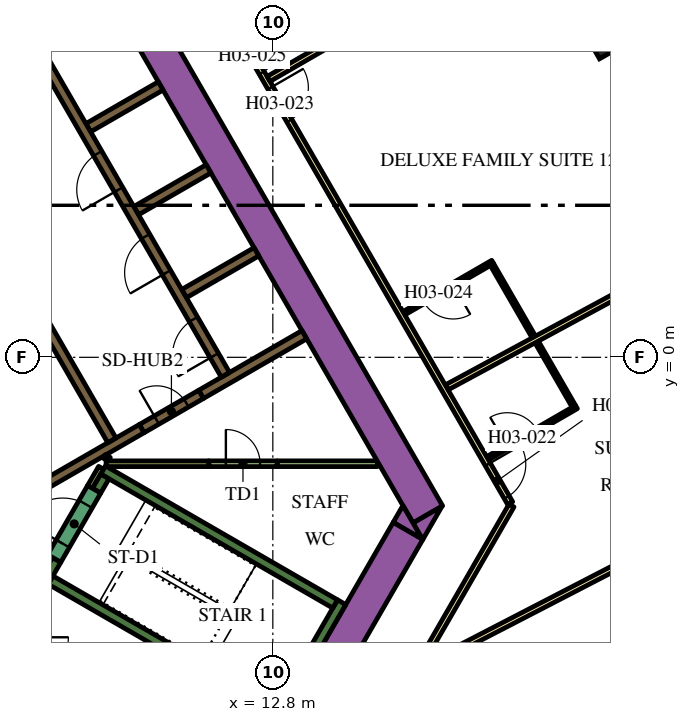
"""IFC4 building model, lengths in metres.
Left out: names, types, materials, properties, quantities, classifications, styles, units other than length and angle.
Written with IfcOpenShell. Run it as: python <this file> out.ifc"""

import sys

from ifc_helpers import new_model, si_unit, direction, frame, frame_2d, origin, origin_2d, place, context, subcontext, project, spatial, polyline, rectangle, outline, extrude, element, fill, save


model = new_model("IFC4")
c1 = context("Model", 3, precision=1e-05, world=origin(), true_north=direction((0.0, 1.0)))
c2 = subcontext(c1, "Body", "Model", "MODEL_VIEW")
j1 = project(units=[si_unit("LENGTHUNIT", "METRE"), si_unit("PLANEANGLEUNIT", "RADIAN")], contexts=[c1])
p1 = place(None, origin())
s1 = spatial("IfcSite", under=j1, at=p1, CompositionType="ELEMENT")
p2 = place(p1, origin())
s2 = spatial("IfcBuilding", under=s1, at=p2, CompositionType="ELEMENT")
p3 = place(p2, frame((0.0, 0.0, 58.8)))
s3 = spatial("IfcBuildingStorey", under=s2, at=p3, CompositionType="ELEMENT", Elevation=58.8)
p4 = place(p3, frame((21.443, 8.685, 0.0), z_axis=(0.0, 0.0, 1.0), x_axis=(-0.491973853463, 0.870609974391, 0.0)))
e1 = element("IfcColumn", 1, at=p4, inside=s3, PredefinedType="COLUMN", context=c2, shape_type="SweptSolid", body=[
    extrude(rectangle(XDim=1.4, YDim=0.9, at=origin_2d()), origin(), (0.0, 0.0, 1.0), 3.9),
])
p5 = place(p3, frame((6.776, 13.364, 0.0), z_axis=(0.0, 0.0, 1.0), x_axis=(0.500004177138, -0.8660229921, 0.0)))
e2 = element("IfcWall", 2, at=p5, inside=s3, PredefinedType="SOLIDWALL", context=c2, shape_type="SweptSolid", body=[
    extrude(rectangle(XDim=20.204, YDim=0.9, at=frame_2d((10.102, 0.0))), origin(), (0.0, 0.0, 1.0), 3.9),
])
p6 = place(p3, origin())
e3 = element("IfcWall", 3, at=p6, inside=s3, PredefinedType="SOLIDWALL", context=c2, shape_type="SweptSolid", body=[
    extrude(outline(polyline([(16.743, -4.8), (16.489, -4.36), (17.251, -3.92), (16.743, -4.8)])), origin(), (0.0, 0.0, 1.0), 3.9),
])
p7 = place(p3, frame((11.695, -12.644, 0.0), z_axis=(0.0, 0.0, 1.0), x_axis=(0.500010229568, 0.86601949766, 0.0)))
e4 = element("IfcWall", 4, at=p7, inside=s3, PredefinedType="SOLIDWALL", context=c2, shape_type="SweptSolid", body=[
    extrude(rectangle(XDim=9.326, YDim=0.9, at=frame_2d((4.663, 0.0))), origin(), (0.0, 0.0, 1.0), 3.9),
])
e5 = element("IfcWall", 5, at=p6, inside=s3, PredefinedType="SOLIDWALL", context=c2, shape_type="SweptSolid", body=[
    extrude(outline(polyline([(16.223, -3.9), (16.732, -4.78), (15.969, -4.34), (16.223, -3.9)])), origin(), (0.0, 0.0, 1.0), 3.9),
])
p8 = place(p3, frame((12.885, -9.431, 0.0), z_axis=(0.0, 0.0, 1.0), x_axis=(0.500020560727, 0.866013532718, 0.0)))
e6 = element("IfcWall", 6, at=p8, inside=s3, PredefinedType="SOLIDWALL", context=c2, shape_type="SweptSolid", body=[
    extrude(rectangle(XDim=3.45, YDim=0.25, at=frame_2d((1.725, 0.0))), origin(), (0.0, 0.0, 1.0), 3.9),
])
p9 = place(p3, frame((12.84, -9.261, 0.0), z_axis=(0.0, 0.0, 1.0), x_axis=(-0.866013990052, 0.500019768644, 0.0)))
e7 = element("IfcWall", 7, at=p9, inside=s3, PredefinedType="SOLIDWALL", context=c2, shape_type="SweptSolid", body=[
    extrude(rectangle(XDim=6.8, YDim=0.25, at=frame_2d((3.4, 0.0))), origin(), (0.0, 0.0, 1.0), 3.9),
])
p10 = place(p3, frame((7.113, -5.33, 0.0), z_axis=(0.0, 0.0, 1.0), x_axis=(-0.499965889992, -0.866045096311, 0.0)))
e8 = element("IfcWall", 8, at=p10, inside=s3, PredefinedType="SOLIDWALL", context=c2, shape_type="SweptSolid", body=[
    extrude(rectangle(XDim=0.666, YDim=0.25, at=frame_2d((0.333, 0.0))), origin(), (0.0, 0.0, 1.0), 3.9),
])
p11 = place(p3, frame((8.334, -2.964, 0.0), z_axis=(0.0, 0.0, 1.0), x_axis=(0.866016039709, -0.500016218704, 0.0)))
e9 = element("IfcWall", 9, at=p11, inside=s3, PredefinedType="SOLIDWALL", context=c2, shape_type="SweptSolid", body=[
    extrude(rectangle(XDim=7.05, YDim=0.25, at=frame_2d((3.525, 0.0))), origin(), (0.0, 0.0, 1.0), 3.9),
])
p12 = place(p3, frame((8.163, -3.511, 0.0), z_axis=(0.0, 0.0, 1.0), x_axis=(0.500127794843, 0.865951608824, 0.0)))
e10 = element("IfcWall", 10, at=p12, inside=s3, PredefinedType="SOLIDWALL", context=c2, shape_type="SweptSolid", body=[
    extrude(rectangle(XDim=0.435, YDim=0.25, at=frame_2d((0.217, 0.0))), origin(), (0.0, 0.0, 1.0), 3.9),
])
p13 = place(p3, frame((10.464, 1.677, 0.0), z_axis=(0.0, 0.0, 1.0), x_axis=(0.86605622881, 0.499946605688, 0.0)))
e11 = element("IfcWall", 11, at=p13, inside=s3, PredefinedType="SOLIDWALL", context=c2, shape_type="SweptSolid", body=[
    extrude(rectangle(XDim=2.2, YDim=0.25, at=frame_2d((1.1, 0.0))), origin(), (0.0, 0.0, 1.0), 3.9),
])
p14 = place(p3, frame((9.352, -1.875, 0.0), z_axis=(0.0, 0.0, 1.0), x_axis=(-0.866024844342, -0.500000968981, 0.0)))
e12 = element("IfcWall", 12, at=p14, inside=s3, PredefinedType="SOLIDWALL", context=c2, shape_type="SweptSolid", body=[
    extrude(rectangle(XDim=3.162, YDim=0.25, at=frame_2d((1.581, 0.0))), origin(), (0.0, 0.0, 1.0), 3.9),
])
for number, where, z_axis, x_axis in (
    (13, (7.944, 6.041, 0.0), (0.0, 0.0, 1.0), (0.866, 0.5, 0.0)),
    (14, (9.204, 3.859, 0.0), (0.0, 0.0, 1.0), (0.866, 0.5, 0.0)),
):
    element("IfcWall", number, at=place(p3, frame(where, z_axis=z_axis, x_axis=x_axis)), inside=s3, PredefinedType="SOLIDWALL", context=c2, shape_type="SweptSolid", body=[
        extrude(rectangle(XDim=2.2, YDim=0.25, at=frame_2d((1.1, 0.0))), origin(), (0.0, 0.0, 1.0), 3.9),
    ])
p15 = place(p3, frame((10.911, -0.975, 0.0), z_axis=(0.0, 0.0, 1.0), x_axis=(0.866046979468, 0.499962627957, 0.0)))
e15 = element("IfcWall", 15, at=p15, inside=s3, PredefinedType="SOLIDWALL", context=c2, shape_type="SweptSolid", body=[
    extrude(rectangle(XDim=3.138, YDim=0.25, at=frame_2d((1.569, 0.0))), origin(), (0.0, 0.0, 1.0), 3.9),
])
p16 = place(p3, frame((8.412, -2.8, 0.0), z_axis=(0.0, 0.0, 1.0), x_axis=(1.0, 0.0, 0.0)))
e16 = element("IfcWall", 16, at=p16, inside=s3, PredefinedType="PARTITIONING", context=c2, shape_type="SweptSolid", body=[
    extrude(rectangle(XDim=2.702, YDim=0.15, at=frame_2d((1.351, 0.0))), origin(), (0.0, 0.0, 1.0), 3.9),
])
p17 = place(p3, frame((8.459, -2.599, 0.0), z_axis=(0.0, 0.0, 1.0), x_axis=(-0.501919277433, -0.864914469148, 0.0)))
e17 = element("IfcWall", 17, at=p17, inside=s3, PredefinedType="PARTITIONING", context=c2, shape_type="SweptSolid", body=[
    extrude(rectangle(XDim=0.109, YDim=0.15, at=frame_2d((0.054, 0.0))), origin(), (0.0, 0.0, 1.0), 3.9),
])
p18 = place(p3, frame((8.281, -2.907, 0.0), z_axis=(0.0, 0.0, 1.0), x_axis=(-0.500193841991, -0.86591346013, 0.0)))
e18 = element("IfcWall", 18, at=p18, inside=s3, PredefinedType="PARTITIONING", context=c2, shape_type="SweptSolid", body=[
    extrude(rectangle(XDim=0.583, YDim=0.15, at=frame_2d((0.292, 0.0))), origin(), (0.0, 0.0, 1.0), 3.9),
])
p19 = place(p3, frame((12.915, -2.8, 0.0), z_axis=(0.0, 0.0, 1.0), x_axis=(1.0, 0.0, 0.0)))
e19 = element("IfcWall", 19, at=p19, inside=s3, PredefinedType="PARTITIONING", context=c2, shape_type="SweptSolid", body=[
    extrude(rectangle(XDim=2.637, YDim=0.15, at=frame_2d((1.318, 0.0))), origin(), (0.0, 0.0, 1.0), 2.75),
])
p20 = place(p3, frame((11.553, -0.46, 0.0), z_axis=(0.0, 0.0, 1.0), x_axis=(-0.500006514828, 0.866021642414, 0.0)))
e20 = element("IfcWall", 20, at=p20, inside=s3, PredefinedType="SOLIDWALL", context=c2, shape_type="SweptSolid", body=[
    extrude(rectangle(XDim=12.35, YDim=0.25, at=frame_2d((6.175, 0.0))), origin(), (0.0, 0.0, 1.0), 3.9),
])
p21 = place(p20, frame((0.585, 0.0, 0.0)))
e21 = element("IfcOpeningElement", 21, at=p21, cuts=e20, PredefinedType="OPENING", context=c2, shape_type="SweptSolid", body=[
    extrude(rectangle(XDim=1.1, YDim=2.1, at=frame_2d((0.55, 1.05))), frame((0.0, 0.135, 0.0), z_axis=(0.0, -1.0, 0.0), x_axis=(1.0, 0.0, 0.0)), (0.0, 0.0, 1.0), 0.27),
])
p22 = place(p20, frame((3.105, 0.0, 0.0)))
e22 = element("IfcOpeningElement", 22, at=p22, cuts=e20, PredefinedType="OPENING", context=c2, shape_type="SweptSolid", body=[
    extrude(rectangle(XDim=1.1, YDim=2.1, at=frame_2d((0.55, 1.05))), frame((0.0, 0.135, 0.0), z_axis=(0.0, -1.0, 0.0), x_axis=(1.0, 0.0, 0.0)), (0.0, 0.0, 1.0), 0.27),
])
p23 = place(p20, frame((5.625, 0.0, 0.0)))
e23 = element("IfcOpeningElement", 23, at=p23, cuts=e20, PredefinedType="OPENING", context=c2, shape_type="SweptSolid", body=[
    extrude(rectangle(XDim=1.1, YDim=2.1, at=frame_2d((0.55, 1.05))), frame((0.0, 0.135, 0.0), z_axis=(0.0, -1.0, 0.0), x_axis=(1.0, 0.0, 0.0)), (0.0, 0.0, 1.0), 0.27),
])
p24 = place(p3, frame((8.565, -2.185, 0.0), z_axis=(0.0, 0.0, 1.0), x_axis=(-0.499997954832, 0.866026584559, 0.0)))
e24 = element("IfcWall", 24, at=p24, inside=s3, PredefinedType="SOLIDWALL", context=c2, shape_type="SweptSolid", body=[
    extrude(rectangle(XDim=12.35, YDim=0.25, at=frame_2d((6.175, 0.0))), origin(), (0.0, 0.0, 1.0), 3.9),
])
p25 = place(p24, frame((5.725, 0.0, 0.0)))
e25 = element("IfcOpeningElement", 25, at=p25, cuts=e24, PredefinedType="OPENING", context=c2, shape_type="SweptSolid", body=[
    extrude(rectangle(XDim=0.9, YDim=2.1, at=frame_2d((0.45, 1.05))), frame((0.0, 0.135, 0.0), z_axis=(0.0, -1.0, 0.0), x_axis=(1.0, 0.0, 0.0)), (0.0, 0.0, 1.0), 0.27),
])
p26 = place(p3, frame((7.048, -5.292, 0.0), z_axis=(0.0, 0.0, 1.0), x_axis=(0.49994051562, 0.866059744384, 0.0)))
e26 = element("IfcWall", 26, at=p26, inside=s3, PredefinedType="SOLIDWALL", context=c2, shape_type="SweptSolid", body=[
    extrude(rectangle(XDim=2.1, YDim=0.4, at=frame_2d((1.05, 0.0))), origin(), (0.0, 0.0, 1.0), 3.9),
])
p27 = place(p26, frame((0.45, 0.0, 0.0)))
e27 = element("IfcOpeningElement", 27, at=p27, cuts=e26, PredefinedType="OPENING", context=c2, shape_type="SweptSolid", body=[
    extrude(rectangle(XDim=1.2, YDim=2.1, at=frame_2d((0.6, 1.05))), frame((0.0, 0.21, 0.0), z_axis=(0.0, -1.0, 0.0), x_axis=(1.0, 0.0, 0.0)), (0.0, 0.0, 1.0), 0.42),
])
p28 = place(p3, frame((9.352, -1.875, 0.0), z_axis=(0.0, 0.0, 1.0), x_axis=(0.865989075817, 0.500062916607, 0.0)))
e28 = element("IfcWall", 28, at=p28, inside=s3, PredefinedType="SOLIDWALL", context=c2, shape_type="SweptSolid", body=[
    extrude(rectangle(XDim=1.8, YDim=0.25, at=frame_2d((0.9, 0.0))), origin(), (0.0, 0.0, 1.0), 3.9),
])
p29 = place(p28, frame((0.45, 0.0, 0.0)))
e29 = element("IfcOpeningElement", 29, at=p29, cuts=e28, PredefinedType="OPENING", context=c2, shape_type="SweptSolid", body=[
    extrude(rectangle(XDim=0.9, YDim=2.1, at=frame_2d((0.45, 1.05))), frame((0.0, 0.135, 0.0), z_axis=(0.0, -1.0, 0.0), x_axis=(1.0, 0.0, 0.0)), (0.0, 0.0, 1.0), 0.27),
])
p30 = place(p3, frame((11.115, -2.8, 0.0), z_axis=(0.0, 0.0, 1.0), x_axis=(1.0, 0.0, 0.0)))
e30 = element("IfcWall", 30, at=p30, inside=s3, PredefinedType="PARTITIONING", context=c2, shape_type="SweptSolid", body=[
    extrude(rectangle(XDim=1.8, YDim=0.15, at=frame_2d((0.9, 0.0))), origin(), (0.0, 0.0, 1.0), 2.75),
])
p31 = place(p30, frame((0.45, 0.0, 0.0)))
e31 = element("IfcOpeningElement", 31, at=p31, cuts=e30, PredefinedType="OPENING", context=c2, shape_type="SweptSolid", body=[
    extrude(rectangle(XDim=0.9, YDim=2.1, at=frame_2d((0.45, 1.05))), frame((0.0, 0.085, 0.0), z_axis=(0.0, -1.0, 0.0), x_axis=(1.0, 0.0, 0.0)), (0.0, 0.0, 1.0), 0.17),
])
p32 = place(p3, frame((19.081, -3.9, 0.0), z_axis=(0.0, 0.0, 1.0), x_axis=(-0.499974327079, -0.866040225545, 0.0)))
e32 = element("IfcWall", 32, at=p32, inside=s3, PredefinedType="PARTITIONING", context=c2, shape_type="SweptSolid", body=[
    extrude(rectangle(XDim=5.258, YDim=0.15, at=frame_2d((2.629, 0.0))), origin(), (0.0, 0.0, 1.0), 2.75),
])
p33 = place(p3, frame((6.163, 18.475, 0.0), z_axis=(0.0, 0.0, 1.0), x_axis=(0.500001317485, -0.866024643133, 0.0)))
e33 = element("IfcWall", 33, at=p33, inside=s3, PredefinedType="PARTITIONING", context=c2, shape_type="SweptSolid", body=[
    extrude(rectangle(XDim=25.767, YDim=0.15, at=frame_2d((12.883, 0.0))), origin(), (0.0, 0.0, 1.0), 2.75),
])
p34 = place(p33, frame((24.586, 0.0, 0.0)))
e34 = element("IfcOpeningElement", 34, at=p34, cuts=e33, PredefinedType="OPENING", context=c2, shape_type="SweptSolid", body=[
    extrude(rectangle(XDim=1.0, YDim=2.1, at=frame_2d((0.5, 1.05))), frame((0.0, 0.085, 0.0), z_axis=(0.0, -1.0, 0.0), x_axis=(1.0, 0.0, 0.0)), (0.0, 0.0, 1.0), 0.17),
])
p35 = place(p33, frame((13.144, 0.0, 0.0)))
e35 = element("IfcOpeningElement", 35, at=p35, cuts=e33, PredefinedType="OPENING", context=c2, shape_type="SweptSolid", body=[
    extrude(rectangle(XDim=1.0, YDim=2.1, at=frame_2d((0.5, 1.05))), frame((0.0, 0.085, 0.0), z_axis=(0.0, -1.0, 0.0), x_axis=(1.0, 0.0, 0.0)), (0.0, 0.0, 1.0), 0.17),
])
p36 = place(p33, frame((11.692, 0.0, 0.0)))
e36 = element("IfcOpeningElement", 36, at=p36, cuts=e33, PredefinedType="OPENING", context=c2, shape_type="SweptSolid", body=[
    extrude(rectangle(XDim=1.0, YDim=2.1, at=frame_2d((0.5, 1.05))), frame((0.0, 0.085, 0.0), z_axis=(0.0, -1.0, 0.0), x_axis=(1.0, 0.0, 0.0)), (0.0, 0.0, 1.0), 0.17),
])
p37 = place(p33, frame((0.572, 0.0, 0.0)))
e37 = element("IfcOpeningElement", 37, at=p37, cuts=e33, PredefinedType="OPENING", context=c2, shape_type="SweptSolid", body=[
    extrude(rectangle(XDim=1.0, YDim=2.1, at=frame_2d((0.5, 1.05))), frame((0.0, 0.085, 0.0), z_axis=(0.0, -1.0, 0.0), x_axis=(1.0, 0.0, 0.0)), (0.0, 0.0, 1.0), 0.17),
])
p38 = place(p3, frame((19.982, 11.537, 0.0), z_axis=(0.0, 0.0, 1.0), x_axis=(-0.866020994654, -0.500007636761, 0.0)))
e38 = element("IfcWall", 38, at=p38, inside=s3, PredefinedType="PARTITIONING", context=c2, shape_type="SweptSolid", body=[
    extrude(rectangle(XDim=8.423, YDim=0.15, at=frame_2d((4.211, 0.0))), origin(), (0.0, 0.0, 1.0), 2.75),
])
p39 = place(p3, frame((27.134, -2.779, 0.0), z_axis=(0.0, 0.0, 1.0), x_axis=(-0.8882049501, -0.459447457951, 0.0)))
e39 = element("IfcWall", 39, at=p39, inside=s3, PredefinedType="PARTITIONING", context=c2, shape_type="SweptSolid", body=[
    extrude(rectangle(XDim=11.638, YDim=0.15, at=frame_2d((5.819, 0.0))), origin(), (0.0, 0.0, 1.0), 2.75),
])
p40 = place(p3, frame((24.145, 2.871, 0.0), z_axis=(0.0, 0.0, 1.0), x_axis=(-0.879551725039, -0.475803281809, 0.0)))
e40 = element("IfcWall", 40, at=p40, inside=s3, PredefinedType="PARTITIONING", context=c2, shape_type="SweptSolid", body=[
    extrude(rectangle(XDim=7.688, YDim=0.15, at=frame_2d((3.844, 0.0))), origin(), (0.0, 0.0, 1.0), 2.75),
])
p41 = place(p3, frame((18.451, -2.657, 0.0), z_axis=(0.0, 0.0, 1.0), x_axis=(0.86599734893, 0.500048589285, 0.0)))
e41 = element("IfcWall", 41, at=p41, inside=s3, PredefinedType="PARTITIONING", context=c2, shape_type="SweptSolid", body=[
    extrude(rectangle(XDim=2.7, YDim=0.1, at=frame_2d((1.35, 0.0))), origin(), (0.0, 0.0, 1.0), 2.75),
])
p42 = place(p41, frame((0.6, 0.0, 0.0)))
e42 = element("IfcOpeningElement", 42, at=p42, cuts=e41, PredefinedType="OPENING", context=c2, shape_type="SweptSolid", body=[
    extrude(rectangle(XDim=0.9, YDim=2.1, at=frame_2d((0.45, 1.05))), frame((0.0, 0.06, 0.0), z_axis=(0.0, -1.0, 0.0), x_axis=(1.0, 0.0, 0.0)), (0.0, 0.0, 1.0), 0.12),
])
p43 = place(p3, frame((20.716, -1.281, 0.0), z_axis=(0.0, 0.0, 1.0), x_axis=(-0.499969367985, 0.866043088465, 0.0)))
e43 = element("IfcWall", 43, at=p43, inside=s3, PredefinedType="PARTITIONING", context=c2, shape_type="SweptSolid", body=[
    extrude(rectangle(XDim=1.94, YDim=0.1, at=frame_2d((0.97, 0.0))), origin(), (0.0, 0.0, 1.0), 2.75),
])
p44 = place(p3, frame((18.586, 2.509, 0.0), z_axis=(0.0, 0.0, 1.0), x_axis=(-0.866059108428, -0.4999416173, 0.0)))
e44 = element("IfcWall", 44, at=p44, inside=s3, PredefinedType="PARTITIONING", context=c2, shape_type="SweptSolid", body=[
    extrude(rectangle(XDim=2.7, YDim=0.1, at=frame_2d((1.35, 0.0))), origin(), (0.0, 0.0, 1.0), 2.75),
])
p45 = place(p44, frame((1.2, 0.0, 0.0)))
e45 = element("IfcOpeningElement", 45, at=p45, cuts=e44, PredefinedType="OPENING", context=c2, shape_type="SweptSolid", body=[
    extrude(rectangle(XDim=0.9, YDim=2.1, at=frame_2d((0.45, 1.05))), frame((0.0, 0.06, 0.0), z_axis=(0.0, -1.0, 0.0), x_axis=(1.0, 0.0, 0.0)), (0.0, 0.0, 1.0), 0.12),
])
p46 = place(p3, frame((18.567, 2.441, 0.0), z_axis=(0.0, 0.0, 1.0), x_axis=(0.499946605688, -0.86605622881, 0.0)))
e46 = element("IfcWall", 46, at=p46, inside=s3, PredefinedType="PARTITIONING", context=c2, shape_type="SweptSolid", body=[
    extrude(rectangle(XDim=2.2, YDim=0.1, at=frame_2d((1.1, 0.0))), origin(), (0.0, 0.0, 1.0), 2.75),
])
p47 = place(p21, origin())
e47 = element("IfcDoor", 47, at=p47, inside=s3, OperationType="DOUBLE_DOOR_SLIDING", PredefinedType="DOOR", context=c2, shape_type="SweptSolid", body=[
    extrude(rectangle(XDim=1.1, YDim=2.1, at=frame_2d((0.55, 1.05))), frame((0.0, 0.025, 0.0), z_axis=(0.0, -1.0, 0.0), x_axis=(1.0, 0.0, 0.0)), (0.0, 0.0, 1.0), 0.05),
])
fill(e21, e47)
p48 = place(p22, origin())
e48 = element("IfcDoor", 48, at=p48, inside=s3, OperationType="DOUBLE_DOOR_SLIDING", PredefinedType="DOOR", context=c2, shape_type="SweptSolid", body=[
    extrude(rectangle(XDim=1.1, YDim=2.1, at=frame_2d((0.55, 1.05))), frame((0.0, 0.025, 0.0), z_axis=(0.0, -1.0, 0.0), x_axis=(1.0, 0.0, 0.0)), (0.0, 0.0, 1.0), 0.05),
])
fill(e22, e48)
p49 = place(p23, origin())
e49 = element("IfcDoor", 49, at=p49, inside=s3, OperationType="DOUBLE_DOOR_SLIDING", PredefinedType="DOOR", context=c2, shape_type="SweptSolid", body=[
    extrude(rectangle(XDim=1.1, YDim=2.1, at=frame_2d((0.55, 1.05))), frame((0.0, 0.025, 0.0), z_axis=(0.0, -1.0, 0.0), x_axis=(1.0, 0.0, 0.0)), (0.0, 0.0, 1.0), 0.05),
])
fill(e23, e49)
p50 = place(p27, origin())
e50 = element("IfcDoor", 50, at=p50, inside=s3, OperationType="SINGLE_SWING_LEFT", PredefinedType="DOOR", context=c2, shape_type="SweptSolid", body=[
    extrude(rectangle(XDim=1.2, YDim=2.1, at=frame_2d((0.6, 1.05))), frame((0.0, 0.025, 0.0), z_axis=(0.0, -1.0, 0.0), x_axis=(1.0, 0.0, 0.0)), (0.0, 0.0, 1.0), 0.05),
])
fill(e27, e50)
p51 = place(p29, origin())
e51 = element("IfcDoor", 51, at=p51, inside=s3, OperationType="SINGLE_SWING_LEFT", PredefinedType="DOOR", context=c2, shape_type="SweptSolid", body=[
    extrude(rectangle(XDim=0.9, YDim=2.1, at=frame_2d((0.45, 1.05))), frame((0.0, 0.025, 0.0), z_axis=(0.0, -1.0, 0.0), x_axis=(1.0, 0.0, 0.0)), (0.0, 0.0, 1.0), 0.05),
])
fill(e29, e51)
p52 = place(p31, origin())
e52 = element("IfcDoor", 52, at=p52, inside=s3, OperationType="SINGLE_SWING_LEFT", PredefinedType="DOOR", context=c2, shape_type="SweptSolid", body=[
    extrude(rectangle(XDim=0.9, YDim=2.1, at=frame_2d((0.45, 1.05))), frame((0.0, 0.025, 0.0), z_axis=(0.0, -1.0, 0.0), x_axis=(1.0, 0.0, 0.0)), (0.0, 0.0, 1.0), 0.05),
])
fill(e31, e52)
p53 = place(p34, origin())
e53 = element("IfcDoor", 53, at=p53, inside=s3, OperationType="SINGLE_SWING_RIGHT", PredefinedType="DOOR", context=c2, shape_type="SweptSolid", body=[
    extrude(rectangle(XDim=1.0, YDim=2.1, at=frame_2d((0.5, 1.05))), frame((0.0, 0.025, 0.0), z_axis=(0.0, -1.0, 0.0), x_axis=(1.0, 0.0, 0.0)), (0.0, 0.0, 1.0), 0.05),
])
fill(e34, e53)
p54 = place(p42, origin())
e54 = element("IfcDoor", 54, at=p54, inside=s3, OperationType="SINGLE_SWING_LEFT", PredefinedType="DOOR", context=c2, shape_type="SweptSolid", body=[
    extrude(rectangle(XDim=0.9, YDim=2.1, at=frame_2d((0.45, 1.05))), frame((0.0, 0.025, 0.0), z_axis=(0.0, -1.0, 0.0), x_axis=(1.0, 0.0, 0.0)), (0.0, 0.0, 1.0), 0.05),
])
fill(e42, e54)
p55 = place(p35, origin())
e55 = element("IfcDoor", 55, at=p55, inside=s3, OperationType="SINGLE_SWING_LEFT", PredefinedType="DOOR", context=c2, shape_type="SweptSolid", body=[
    extrude(rectangle(XDim=1.0, YDim=2.1, at=frame_2d((0.5, 1.05))), frame((0.0, 0.025, 0.0), z_axis=(0.0, -1.0, 0.0), x_axis=(1.0, 0.0, 0.0)), (0.0, 0.0, 1.0), 0.05),
])
fill(e35, e55)
p56 = place(p45, origin())
e56 = element("IfcDoor", 56, at=p56, inside=s3, OperationType="SINGLE_SWING_RIGHT", PredefinedType="DOOR", context=c2, shape_type="SweptSolid", body=[
    extrude(rectangle(XDim=0.9, YDim=2.1, at=frame_2d((0.45, 1.05))), frame((0.0, 0.025, 0.0), z_axis=(0.0, -1.0, 0.0), x_axis=(1.0, 0.0, 0.0)), (0.0, 0.0, 1.0), 0.05),
])
fill(e45, e56)
p57 = place(p36, origin())
e57 = element("IfcDoor", 57, at=p57, inside=s3, OperationType="SINGLE_SWING_RIGHT", PredefinedType="DOOR", context=c2, shape_type="SweptSolid", body=[
    extrude(rectangle(XDim=1.0, YDim=2.1, at=frame_2d((0.5, 1.05))), frame((0.0, 0.025, 0.0), z_axis=(0.0, -1.0, 0.0), x_axis=(1.0, 0.0, 0.0)), (0.0, 0.0, 1.0), 0.05),
])
fill(e36, e57)
save(model, sys.argv[1])
